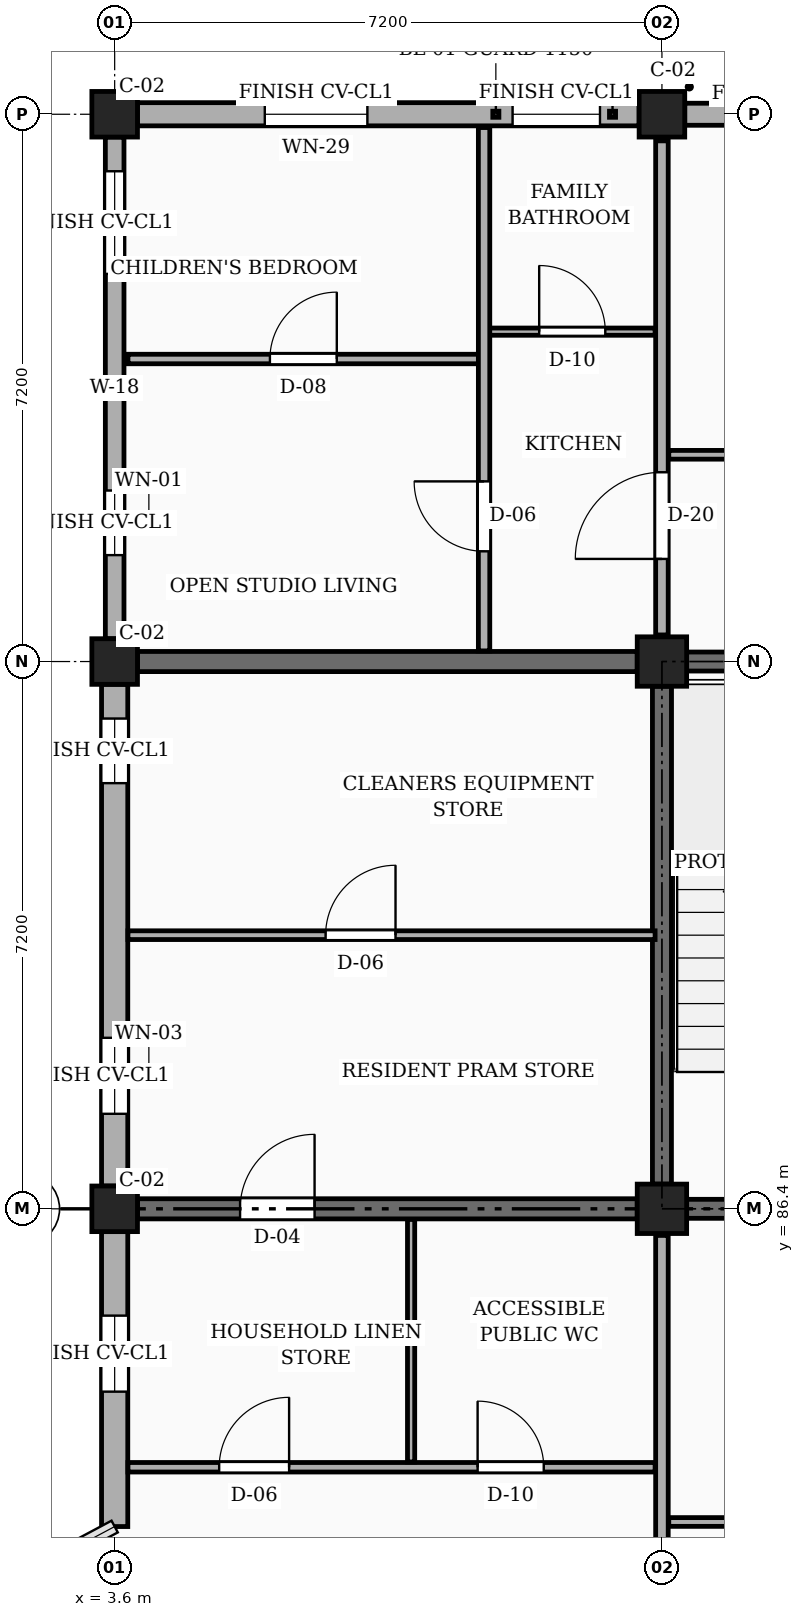
"""IFC4 building model, lengths in metres.
Left out: names, types, materials, properties, quantities, classifications, styles, units other than length and angle.
Written with IfcOpenShell. Run it as: python <this file> out.ifc"""

import sys

from ifc_helpers import new_model, si_unit, direction, frame, frame_2d, origin, origin_2d, place, context, subcontext, project, spatial, rectangle, extrude, element, fill, save


model = new_model("IFC4")
c1 = context("Model", 3, precision=1e-05, world=origin(), true_north=direction((0.0, 1.0)))
c2 = subcontext(c1, "Body", "Model", "MODEL_VIEW")
j1 = project(units=[si_unit("LENGTHUNIT", "METRE"), si_unit("PLANEANGLEUNIT", "RADIAN")], contexts=[c1])
p1 = place(None, origin())
s1 = spatial("IfcSite", under=j1, at=p1, CompositionType="ELEMENT")
p2 = place(p1, origin())
s2 = spatial("IfcBuilding", under=s1, at=p2, CompositionType="ELEMENT")
p3 = place(p2, frame((0.0, 0.0, 7.65)))
s3 = spatial("IfcBuildingStorey", under=s2, at=p3, CompositionType="ELEMENT", Elevation=7.65)
for number, where, z_axis, x_axis in (
    (1, (3.6, 86.4, 0.0), (0.0, 0.0, 1.0), (1.0, 0.0, 0.0)),
    (2, (3.6, 93.6, 0.0), (0.0, 0.0, 1.0), (1.0, 0.0, 0.0)),
    (3, (3.6, 100.8, 0.0), (0.0, 0.0, 1.0), (1.0, 0.0, 0.0)),
):
    element("IfcColumn", number, at=place(p3, frame(where, z_axis=z_axis, x_axis=x_axis)), inside=s3, PredefinedType="COLUMN", context=c2, shape_type="SweptSolid", body=[
        extrude(rectangle(XDim=0.6, YDim=0.6, at=origin_2d()), origin(), (0.0, 0.0, 1.0), 3.15),
    ])
for number, where, z_axis, x_axis in (
    (4, (10.8, 86.4, 0.0), (0.0, 0.0, 1.0), (1.0, 0.0, 0.0)),
    (5, (10.8, 93.6, 0.0), (0.0, 0.0, 1.0), (1.0, 0.0, 0.0)),
):
    element("IfcColumn", number, at=place(p3, frame(where, z_axis=z_axis, x_axis=x_axis)), inside=s3, PredefinedType="COLUMN", context=c2, shape_type="SweptSolid", body=[
        extrude(rectangle(XDim=0.65, YDim=0.65, at=origin_2d()), origin(), (0.0, 0.0, 1.0), 3.15),
    ])
p4 = place(p3, frame((10.8, 100.8, 0.0), z_axis=(0.0, 0.0, 1.0), x_axis=(1.0, 0.0, 0.0)))
e6 = element("IfcColumn", 6, at=p4, inside=s3, PredefinedType="COLUMN", context=c2, shape_type="SweptSolid", body=[
    extrude(rectangle(XDim=0.6, YDim=0.6, at=origin_2d()), origin(), (0.0, 0.0, 1.0), 3.15),
])
p5 = place(p3, frame((3.9, 86.4, 0.0), z_axis=(0.0, 0.0, 1.0), x_axis=(1.0, 0.0, 0.0)))
e7 = element("IfcWall", 7, at=p5, inside=s3, PredefinedType="SOLIDWALL", context=c2, shape_type="SweptSolid", body=[
    extrude(rectangle(XDim=6.575, YDim=0.265, at=frame_2d((3.288, 0.0))), origin(), (0.0, 0.0, 1.0), 2.21),
])
p6 = place(p5, frame((1.35, 0.0, 0.0)))
e8 = element("IfcOpeningElement", 8, at=p6, cuts=e7, PredefinedType="OPENING", context=c2, shape_type="SweptSolid", body=[
    extrude(rectangle(XDim=0.98, YDim=2.12, at=frame_2d((0.49, 1.06))), frame((0.0, 0.143, 0.0), z_axis=(0.0, -1.0, 0.0), x_axis=(1.0, 0.0, 0.0)), (0.0, 0.0, 1.0), 0.285),
])
p7 = place(p3, frame((3.9, 93.6, 0.0), z_axis=(0.0, 0.0, 1.0), x_axis=(1.0, 0.0, 0.0)))
e9 = element("IfcWall", 9, at=p7, inside=s3, PredefinedType="SOLIDWALL", context=c2, shape_type="SweptSolid", body=[
    extrude(rectangle(XDim=6.575, YDim=0.265, at=frame_2d((3.288, 0.0))), origin(), (0.0, 0.0, 1.0), 2.21),
])
p8 = place(p3, frame((17.7, 100.8, 0.0), z_axis=(0.0, 0.0, 1.0), x_axis=(-1.0, 0.0, 0.0)))
e10 = element("IfcWall", 10, at=p8, inside=s3, PredefinedType="SOLIDWALL", context=c2, shape_type="SweptSolid", body=[
    extrude(rectangle(XDim=6.6, YDim=0.29, at=frame_2d((3.3, 0.0))), origin(), (0.0, 0.0, 1.0), 2.48),
])
p9 = place(p8, frame((0.45, 0.0, 0.78)))
e11 = element("IfcOpeningElement", 11, at=p9, cuts=e10, PredefinedType="OPENING", context=c2, shape_type="SweptSolid", body=[
    extrude(rectangle(XDim=0.94, YDim=1.44, at=frame_2d((0.47, 0.72))), frame((0.0, 0.155, 0.0), z_axis=(0.0, -1.0, 0.0), x_axis=(1.0, 0.0, 0.0)), (0.0, 0.0, 1.0), 0.31),
])
p10 = place(p8, frame((4.65, 0.0, 0.78)))
e12 = element("IfcOpeningElement", 12, at=p10, cuts=e10, PredefinedType="OPENING", context=c2, shape_type="SweptSolid", body=[
    extrude(rectangle(XDim=1.15, YDim=1.44, at=frame_2d((0.575, 0.72))), frame((0.0, 0.155, 0.0), z_axis=(0.0, -1.0, 0.0), x_axis=(1.0, 0.0, 0.0)), (0.0, 0.0, 1.0), 0.31),
])
p11 = place(p3, frame((10.5, 100.8, 0.0), z_axis=(0.0, 0.0, 1.0), x_axis=(-1.0, 0.0, 0.0)))
e13 = element("IfcWall", 13, at=p11, inside=s3, PredefinedType="SOLIDWALL", context=c2, shape_type="SweptSolid", body=[
    extrude(rectangle(XDim=6.6, YDim=0.305, at=frame_2d((3.3, 0.0))), origin(), (0.0, 0.0, 1.0), 2.48),
])
p12 = place(p11, frame((0.515, 0.0, 0.78)))
e14 = element("IfcOpeningElement", 14, at=p12, cuts=e13, PredefinedType="OPENING", context=c2, shape_type="SweptSolid", body=[
    extrude(rectangle(XDim=1.15, YDim=1.44, at=frame_2d((0.575, 0.72))), frame((0.0, 0.163, 0.0), z_axis=(0.0, -1.0, 0.0), x_axis=(1.0, 0.0, 0.0)), (0.0, 0.0, 1.0), 0.325),
])
p13 = place(p11, frame((3.575, 0.0, 0.78)))
e15 = element("IfcOpeningElement", 15, at=p13, cuts=e13, PredefinedType="OPENING", context=c2, shape_type="SweptSolid", body=[
    extrude(rectangle(XDim=1.35, YDim=1.44, at=frame_2d((0.675, 0.72))), frame((0.0, 0.163, 0.0), z_axis=(0.0, -1.0, 0.0), x_axis=(1.0, 0.0, 0.0)), (0.0, 0.0, 1.0), 0.325),
])
p14 = place(p3, frame((3.6, 100.5, 0.0), z_axis=(0.0, 0.0, 1.0), x_axis=(0.0, -1.0, 0.0)))
e16 = element("IfcWall", 16, at=p14, inside=s3, PredefinedType="SOLIDWALL", context=c2, shape_type="SweptSolid", body=[
    extrude(rectangle(XDim=6.6, YDim=0.245, at=frame_2d((3.3, 0.0))), origin(), (0.0, 0.0, 1.0), 2.48),
])
p15 = place(p14, frame((0.45, 0.0, 0.78)))
e17 = element("IfcOpeningElement", 17, at=p15, cuts=e16, PredefinedType="OPENING", context=c2, shape_type="SweptSolid", body=[
    extrude(rectangle(XDim=1.35, YDim=1.44, at=frame_2d((0.675, 0.72))), frame((0.0, 0.133, 0.0), z_axis=(0.0, -1.0, 0.0), x_axis=(1.0, 0.0, 0.0)), (0.0, 0.0, 1.0), 0.265),
])
p16 = place(p14, frame((4.65, 0.0, 0.78)))
e18 = element("IfcOpeningElement", 18, at=p16, cuts=e16, PredefinedType="OPENING", context=c2, shape_type="SweptSolid", body=[
    extrude(rectangle(XDim=0.85, YDim=1.15, at=frame_2d((0.425, 0.575))), frame((0.0, 0.133, 0.0), z_axis=(0.0, -1.0, 0.0), x_axis=(1.0, 0.0, 0.0)), (0.0, 0.0, 1.0), 0.265),
])
p17 = place(p3, frame((3.6, 93.3, 0.0), z_axis=(0.0, 0.0, 1.0), x_axis=(0.0, -1.0, 0.0)))
e19 = element("IfcWall", 19, at=p17, inside=s3, PredefinedType="SOLIDWALL", context=c2, shape_type="SweptSolid", body=[
    extrude(rectangle(XDim=6.6, YDim=0.345, at=frame_2d((3.3, 0.0))), origin(), (0.0, 0.0, 1.0), 2.48),
])
p18 = place(p17, frame((0.45, 0.0, 0.78)))
e20 = element("IfcOpeningElement", 20, at=p18, cuts=e19, PredefinedType="OPENING", context=c2, shape_type="SweptSolid", body=[
    extrude(rectangle(XDim=0.85, YDim=1.15, at=frame_2d((0.425, 0.575))), frame((0.0, 0.183, 0.0), z_axis=(0.0, -1.0, 0.0), x_axis=(1.0, 0.0, 0.0)), (0.0, 0.0, 1.0), 0.365),
])
p19 = place(p17, frame((4.65, 0.0, 0.78)))
e21 = element("IfcOpeningElement", 21, at=p19, cuts=e19, PredefinedType="OPENING", context=c2, shape_type="SweptSolid", body=[
    extrude(rectangle(XDim=1.0, YDim=1.15, at=frame_2d((0.5, 0.575))), frame((0.0, 0.183, 0.0), z_axis=(0.0, -1.0, 0.0), x_axis=(1.0, 0.0, 0.0)), (0.0, 0.0, 1.0), 0.365),
])
p20 = place(p3, frame((3.6, 86.1, 0.0), z_axis=(0.0, 0.0, 1.0), x_axis=(0.0, -1.0, 0.0)))
e22 = element("IfcWall", 22, at=p20, inside=s3, PredefinedType="SOLIDWALL", context=c2, shape_type="SweptSolid", body=[
    extrude(rectangle(XDim=3.88, YDim=0.345, at=frame_2d((1.94, 0.0))), origin(), (0.0, 0.0, 1.0), 2.48),
])
p21 = place(p20, frame((1.105, 0.0, 0.78)))
e23 = element("IfcOpeningElement", 23, at=p21, cuts=e22, PredefinedType="OPENING", context=c2, shape_type="SweptSolid", body=[
    extrude(rectangle(XDim=1.0, YDim=1.15, at=frame_2d((0.5, 0.575))), frame((0.0, 0.183, 0.0), z_axis=(0.0, -1.0, 0.0), x_axis=(1.0, 0.0, 0.0)), (0.0, 0.0, 1.0), 0.365),
])
p22 = place(p3, frame((10.8, 86.725, 0.0), z_axis=(0.0, 0.0, 1.0), x_axis=(0.0, 1.0, 0.0)))
e24 = element("IfcWall", 24, at=p22, inside=s3, PredefinedType="SHEAR", context=c2, shape_type="SweptSolid", body=[
    extrude(rectangle(XDim=6.55, YDim=0.25, at=frame_2d((3.275, 0.0))), origin(), (0.0, 0.0, 1.0), 2.91),
])
for number, where, z_axis, x_axis in (
    (25, (11.125, 93.6, 0.0), (0.0, 0.0, 1.0), (1.0, 0.0, 0.0)),
    (26, (11.125, 86.4, 0.0), (0.0, 0.0, 1.0), (1.0, 0.0, 0.0)),
):
    element("IfcWall", number, at=place(p3, frame(where, z_axis=z_axis, x_axis=x_axis)), inside=s3, PredefinedType="SHEAR", context=c2, shape_type="SweptSolid", body=[
        extrude(rectangle(XDim=6.55, YDim=0.25, at=frame_2d((3.275, 0.0))), origin(), (0.0, 0.0, 1.0), 2.91),
    ])
p23 = place(p3, frame((10.8, 79.55, 0.0), z_axis=(0.0, 0.0, 1.0), x_axis=(0.0, 1.0, 0.0)))
e27 = element("IfcWall", 27, at=p23, inside=s3, PredefinedType="PARTITIONING", context=c2, shape_type="SweptSolid", body=[
    extrude(rectangle(XDim=6.5, YDim=0.165, at=frame_2d((3.25, 0.0))), origin(), (0.0, 0.0, 1.0), 2.26),
])
p24 = place(p23, frame((1.1, 0.0, 0.0)))
e28 = element("IfcOpeningElement", 28, at=p24, cuts=e27, PredefinedType="OPENING", context=c2, shape_type="SweptSolid", body=[
    extrude(rectangle(XDim=0.94, YDim=2.12, at=frame_2d((0.47, 1.06))), frame((0.0, 0.093, 0.0), z_axis=(0.0, -1.0, 0.0), x_axis=(1.0, 0.0, 0.0)), (0.0, 0.0, 1.0), 0.185),
])
p25 = place(p3, frame((10.8, 93.95, 0.0), z_axis=(0.0, 0.0, 1.0), x_axis=(0.0, 1.0, 0.0)))
e29 = element("IfcWall", 29, at=p25, inside=s3, PredefinedType="PARTITIONING", context=c2, shape_type="SweptSolid", body=[
    extrude(rectangle(XDim=6.5, YDim=0.165, at=frame_2d((3.25, 0.0))), origin(), (0.0, 0.0, 1.0), 2.26),
])
p26 = place(p25, frame((1.0, 0.0, 0.0)))
e30 = element("IfcOpeningElement", 30, at=p26, cuts=e29, PredefinedType="OPENING", context=c2, shape_type="SweptSolid", body=[
    extrude(rectangle(XDim=1.14, YDim=2.18, at=frame_2d((0.57, 1.09))), frame((0.0, 0.093, 0.0), z_axis=(0.0, -1.0, 0.0), x_axis=(1.0, 0.0, 0.0)), (0.0, 0.0, 1.0), 0.185),
])
p27 = place(p3, frame((10.89, 82.28, 0.0), z_axis=(0.0, 0.0, 1.0), x_axis=(1.0, 0.0, 0.0)))
e31 = element("IfcWall", 31, at=p27, inside=s3, PredefinedType="PARTITIONING", context=c2, shape_type="SweptSolid", body=[
    extrude(rectangle(XDim=7.02, YDim=0.115, at=frame_2d((3.51, 0.0))), origin(), (0.0, 0.0, 1.0), 2.345),
])
p28 = place(p27, frame((2.85, 0.0, 0.0)))
e32 = element("IfcOpeningElement", 32, at=p28, cuts=e31, PredefinedType="OPENING", context=c2, shape_type="SweptSolid", body=[
    extrude(rectangle(XDim=1.02, YDim=2.15, at=frame_2d((0.51, 1.075))), frame((0.0, 0.067, 0.0), z_axis=(0.0, -1.0, 0.0), x_axis=(1.0, 0.0, 0.0)), (0.0, 0.0, 1.0), 0.135),
])
p29 = place(p3, frame((3.775, 83.0, 0.0), z_axis=(0.0, 0.0, 1.0), x_axis=(1.0, 0.0, 0.0)))
e33 = element("IfcWall", 33, at=p29, inside=s3, PredefinedType="PARTITIONING", context=c2, shape_type="SweptSolid", body=[
    extrude(rectangle(XDim=6.935, YDim=0.125, at=frame_2d((3.468, 0.0))), origin(), (0.0, 0.0, 1.0), 2.345),
])
p30 = place(p29, frame((4.6, 0.0, 0.0)))
e34 = element("IfcOpeningElement", 34, at=p30, cuts=e33, PredefinedType="OPENING", context=c2, shape_type="SweptSolid", body=[
    extrude(rectangle(XDim=0.87, YDim=2.05, at=frame_2d((0.435, 1.025))), frame((0.0, 0.073, 0.0), z_axis=(0.0, -1.0, 0.0), x_axis=(1.0, 0.0, 0.0)), (0.0, 0.0, 1.0), 0.145),
])
p31 = place(p29, frame((1.2, 0.0, 0.0)))
e35 = element("IfcOpeningElement", 35, at=p31, cuts=e33, PredefinedType="OPENING", context=c2, shape_type="SweptSolid", body=[
    extrude(rectangle(XDim=0.92, YDim=2.1, at=frame_2d((0.46, 1.05))), frame((0.0, 0.073, 0.0), z_axis=(0.0, -1.0, 0.0), x_axis=(1.0, 0.0, 0.0)), (0.0, 0.0, 1.0), 0.145),
])
p32 = place(p3, frame((7.5, 83.07, 0.0), z_axis=(0.0, 0.0, 1.0), x_axis=(0.0, 1.0, 0.0)))
e36 = element("IfcWall", 36, at=p32, inside=s3, PredefinedType="PARTITIONING", context=c2, shape_type="SweptSolid", body=[
    extrude(rectangle(XDim=3.19, YDim=0.095, at=frame_2d((1.595, 0.0))), origin(), (0.0, 0.0, 1.0), 2.345),
])
p33 = place(p3, frame((3.775, 90.0, 0.0), z_axis=(0.0, 0.0, 1.0), x_axis=(1.0, 0.0, 0.0)))
e37 = element("IfcWall", 37, at=p33, inside=s3, PredefinedType="PARTITIONING", context=c2, shape_type="SweptSolid", body=[
    extrude(rectangle(XDim=6.935, YDim=0.115, at=frame_2d((3.468, 0.0))), origin(), (0.0, 0.0, 1.0), 2.345),
])
p34 = place(p33, frame((2.6, 0.0, 0.0)))
e38 = element("IfcOpeningElement", 38, at=p34, cuts=e37, PredefinedType="OPENING", context=c2, shape_type="SweptSolid", body=[
    extrude(rectangle(XDim=0.92, YDim=2.1, at=frame_2d((0.46, 1.05))), frame((0.0, 0.067, 0.0), z_axis=(0.0, -1.0, 0.0), x_axis=(1.0, 0.0, 0.0)), (0.0, 0.0, 1.0), 0.135),
])
p35 = place(p3, frame((10.89, 96.32, 0.0), z_axis=(0.0, 0.0, 1.0), x_axis=(1.0, 0.0, 0.0)))
e39 = element("IfcWall", 39, at=p35, inside=s3, PredefinedType="PARTITIONING", context=c2, shape_type="SweptSolid", body=[
    extrude(rectangle(XDim=7.02, YDim=0.115, at=frame_2d((3.51, 0.0))), origin(), (0.0, 0.0, 1.0), 2.345),
])
p36 = place(p35, frame((2.85, 0.0, 0.0)))
e40 = element("IfcOpeningElement", 40, at=p36, cuts=e39, PredefinedType="OPENING", context=c2, shape_type="SweptSolid", body=[
    extrude(rectangle(XDim=1.02, YDim=2.15, at=frame_2d((0.51, 1.075))), frame((0.0, 0.067, 0.0), z_axis=(0.0, -1.0, 0.0), x_axis=(1.0, 0.0, 0.0)), (0.0, 0.0, 1.0), 0.135),
])
p37 = place(p3, frame((3.775, 97.58, 0.0), z_axis=(0.0, 0.0, 1.0), x_axis=(1.0, 0.0, 0.0)))
e41 = element("IfcWall", 41, at=p37, inside=s3, PredefinedType="PARTITIONING", context=c2, shape_type="SweptSolid", body=[
    extrude(rectangle(XDim=4.615, YDim=0.125, at=frame_2d((2.308, 0.0))), origin(), (0.0, 0.0, 1.0), 2.345),
])
p38 = place(p37, frame((1.867, 0.0, 0.0)))
e42 = element("IfcOpeningElement", 42, at=p38, cuts=e41, PredefinedType="OPENING", context=c2, shape_type="SweptSolid", body=[
    extrude(rectangle(XDim=0.88, YDim=2.08, at=frame_2d((0.44, 1.04))), frame((0.0, 0.073, 0.0), z_axis=(0.0, -1.0, 0.0), x_axis=(1.0, 0.0, 0.0)), (0.0, 0.0, 1.0), 0.145),
])
p39 = place(p3, frame((8.53, 97.94, 0.0), z_axis=(0.0, 0.0, 1.0), x_axis=(1.0, 0.0, 0.0)))
e43 = element("IfcWall", 43, at=p39, inside=s3, PredefinedType="PARTITIONING", context=c2, shape_type="SweptSolid", body=[
    extrude(rectangle(XDim=2.18, YDim=0.095, at=frame_2d((1.09, 0.0))), origin(), (0.0, 0.0, 1.0), 2.345),
])
p40 = place(p39, frame((0.655, 0.0, 0.0)))
e44 = element("IfcOpeningElement", 44, at=p40, cuts=e43, PredefinedType="OPENING", context=c2, shape_type="SweptSolid", body=[
    extrude(rectangle(XDim=0.87, YDim=2.05, at=frame_2d((0.435, 1.025))), frame((0.0, 0.058, 0.0), z_axis=(0.0, -1.0, 0.0), x_axis=(1.0, 0.0, 0.0)), (0.0, 0.0, 1.0), 0.115),
])
p41 = place(p3, frame((8.46, 93.74, 0.0), z_axis=(0.0, 0.0, 1.0), x_axis=(0.0, 1.0, 0.0)))
e45 = element("IfcWall", 45, at=p41, inside=s3, PredefinedType="PARTITIONING", context=c2, shape_type="SweptSolid", body=[
    extrude(rectangle(XDim=6.885, YDim=0.15, at=frame_2d((3.442, 0.0))), origin(), (0.0, 0.0, 1.0), 2.345),
])
p42 = place(p41, frame((1.31, 0.0, 0.0)))
e46 = element("IfcOpeningElement", 46, at=p42, cuts=e45, PredefinedType="OPENING", context=c2, shape_type="SweptSolid", body=[
    extrude(rectangle(XDim=0.92, YDim=2.1, at=frame_2d((0.46, 1.05))), frame((0.0, 0.085, 0.0), z_axis=(0.0, -1.0, 0.0), x_axis=(1.0, 0.0, 0.0)), (0.0, 0.0, 1.0), 0.17),
])
p43 = place(p12, origin())
e47 = element("IfcWindow", 47, at=p43, inside=s3, PartitioningType="SINGLE_PANEL", PredefinedType="WINDOW", context=c2, shape_type="SweptSolid", body=[
    extrude(rectangle(XDim=1.15, YDim=1.44, at=frame_2d((0.575, 0.72))), frame((0.0, 0.03, 0.0), z_axis=(0.0, -1.0, 0.0), x_axis=(1.0, 0.0, 0.0)), (0.0, 0.0, 1.0), 0.06),
])
fill(e14, e47)
p44 = place(p13, origin())
e48 = element("IfcWindow", 48, at=p44, inside=s3, PartitioningType="SINGLE_PANEL", PredefinedType="WINDOW", context=c2, shape_type="SweptSolid", body=[
    extrude(rectangle(XDim=1.35, YDim=1.44, at=frame_2d((0.675, 0.72))), frame((0.0, 0.03, 0.0), z_axis=(0.0, -1.0, 0.0), x_axis=(1.0, 0.0, 0.0)), (0.0, 0.0, 1.0), 0.06),
])
fill(e15, e48)
p45 = place(p15, origin())
e49 = element("IfcWindow", 49, at=p45, inside=s3, PartitioningType="SINGLE_PANEL", PredefinedType="WINDOW", context=c2, shape_type="SweptSolid", body=[
    extrude(rectangle(XDim=1.35, YDim=1.44, at=frame_2d((0.675, 0.72))), frame((0.0, 0.03, 0.0), z_axis=(0.0, -1.0, 0.0), x_axis=(1.0, 0.0, 0.0)), (0.0, 0.0, 1.0), 0.06),
])
fill(e17, e49)
p46 = place(p16, origin())
e50 = element("IfcWindow", 50, at=p46, inside=s3, PartitioningType="SINGLE_PANEL", PredefinedType="WINDOW", context=c2, shape_type="SweptSolid", body=[
    extrude(rectangle(XDim=0.85, YDim=1.15, at=frame_2d((0.425, 0.575))), frame((0.0, 0.03, 0.0), z_axis=(0.0, -1.0, 0.0), x_axis=(1.0, 0.0, 0.0)), (0.0, 0.0, 1.0), 0.06),
])
fill(e18, e50)
p47 = place(p18, origin())
e51 = element("IfcWindow", 51, at=p47, inside=s3, PartitioningType="SINGLE_PANEL", PredefinedType="WINDOW", context=c2, shape_type="SweptSolid", body=[
    extrude(rectangle(XDim=0.85, YDim=1.15, at=frame_2d((0.425, 0.575))), frame((0.0, 0.03, 0.0), z_axis=(0.0, -1.0, 0.0), x_axis=(1.0, 0.0, 0.0)), (0.0, 0.0, 1.0), 0.06),
])
fill(e20, e51)
p48 = place(p19, origin())
e52 = element("IfcWindow", 52, at=p48, inside=s3, PartitioningType="SINGLE_PANEL", PredefinedType="WINDOW", context=c2, shape_type="SweptSolid", body=[
    extrude(rectangle(XDim=1.0, YDim=1.15, at=frame_2d((0.5, 0.575))), frame((0.0, 0.03, 0.0), z_axis=(0.0, -1.0, 0.0), x_axis=(1.0, 0.0, 0.0)), (0.0, 0.0, 1.0), 0.06),
])
fill(e21, e52)
p49 = place(p21, origin())
e53 = element("IfcWindow", 53, at=p49, inside=s3, PartitioningType="SINGLE_PANEL", PredefinedType="WINDOW", context=c2, shape_type="SweptSolid", body=[
    extrude(rectangle(XDim=1.0, YDim=1.15, at=frame_2d((0.5, 0.575))), frame((0.0, 0.03, 0.0), z_axis=(0.0, -1.0, 0.0), x_axis=(1.0, 0.0, 0.0)), (0.0, 0.0, 1.0), 0.06),
])
fill(e23, e53)
p50 = place(p26, origin())
e54 = element("IfcDoor", 54, at=p50, inside=s3, OperationType="SINGLE_SWING_LEFT", PredefinedType="DOOR", context=c2, shape_type="SweptSolid", body=[
    extrude(rectangle(XDim=1.14, YDim=2.18, at=frame_2d((0.57, 1.09))), frame((0.0, 0.025, 0.0), z_axis=(0.0, -1.0, 0.0), x_axis=(1.0, 0.0, 0.0)), (0.0, 0.0, 1.0), 0.05),
])
fill(e30, e54)
p51 = place(p30, origin())
e55 = element("IfcDoor", 55, at=p51, inside=s3, OperationType="SINGLE_SWING_LEFT", PredefinedType="DOOR", context=c2, shape_type="SweptSolid", body=[
    extrude(rectangle(XDim=0.87, YDim=2.05, at=frame_2d((0.435, 1.025))), frame((0.0, 0.025, 0.0), z_axis=(0.0, -1.0, 0.0), x_axis=(1.0, 0.0, 0.0)), (0.0, 0.0, 1.0), 0.05),
])
fill(e34, e55)
p52 = place(p31, origin())
e56 = element("IfcDoor", 56, at=p52, inside=s3, OperationType="SINGLE_SWING_RIGHT", PredefinedType="DOOR", context=c2, shape_type="SweptSolid", body=[
    extrude(rectangle(XDim=0.92, YDim=2.1, at=frame_2d((0.46, 1.05))), frame((0.0, 0.025, 0.0), z_axis=(0.0, -1.0, 0.0), x_axis=(1.0, 0.0, 0.0)), (0.0, 0.0, 1.0), 0.05),
])
fill(e35, e56)
p53 = place(p34, origin())
e57 = element("IfcDoor", 57, at=p53, inside=s3, OperationType="SINGLE_SWING_RIGHT", PredefinedType="DOOR", context=c2, shape_type="SweptSolid", body=[
    extrude(rectangle(XDim=0.92, YDim=2.1, at=frame_2d((0.46, 1.05))), frame((0.0, 0.025, 0.0), z_axis=(0.0, -1.0, 0.0), x_axis=(1.0, 0.0, 0.0)), (0.0, 0.0, 1.0), 0.05),
])
fill(e38, e57)
p54 = place(p38, origin())
e58 = element("IfcDoor", 58, at=p54, inside=s3, OperationType="SINGLE_SWING_RIGHT", PredefinedType="DOOR", context=c2, shape_type="SweptSolid", body=[
    extrude(rectangle(XDim=0.88, YDim=2.08, at=frame_2d((0.44, 1.04))), frame((0.0, 0.025, 0.0), z_axis=(0.0, -1.0, 0.0), x_axis=(1.0, 0.0, 0.0)), (0.0, 0.0, 1.0), 0.05),
])
fill(e42, e58)
p55 = place(p40, origin())
e59 = element("IfcDoor", 59, at=p55, inside=s3, OperationType="SINGLE_SWING_LEFT", PredefinedType="DOOR", context=c2, shape_type="SweptSolid", body=[
    extrude(rectangle(XDim=0.87, YDim=2.05, at=frame_2d((0.435, 1.025))), frame((0.0, 0.025, 0.0), z_axis=(0.0, -1.0, 0.0), x_axis=(1.0, 0.0, 0.0)), (0.0, 0.0, 1.0), 0.05),
])
fill(e44, e59)
p56 = place(p42, origin())
e60 = element("IfcDoor", 60, at=p56, inside=s3, OperationType="SINGLE_SWING_RIGHT", PredefinedType="DOOR", context=c2, shape_type="SweptSolid", body=[
    extrude(rectangle(XDim=0.92, YDim=2.1, at=frame_2d((0.46, 1.05))), frame((0.0, 0.025, 0.0), z_axis=(0.0, -1.0, 0.0), x_axis=(1.0, 0.0, 0.0)), (0.0, 0.0, 1.0), 0.05),
])
fill(e46, e60)
p57 = place(p6, origin())
e61 = element("IfcDoor", 61, at=p57, inside=s3, OperationType="SINGLE_SWING_RIGHT", PredefinedType="DOOR", context=c2, shape_type="SweptSolid", body=[
    extrude(rectangle(XDim=0.98, YDim=2.12, at=frame_2d((0.49, 1.06))), frame((0.0, 0.025, 0.0), z_axis=(0.0, -1.0, 0.0), x_axis=(1.0, 0.0, 0.0)), (0.0, 0.0, 1.0), 0.05),
])
fill(e8, e61)
save(model, sys.argv[1])
